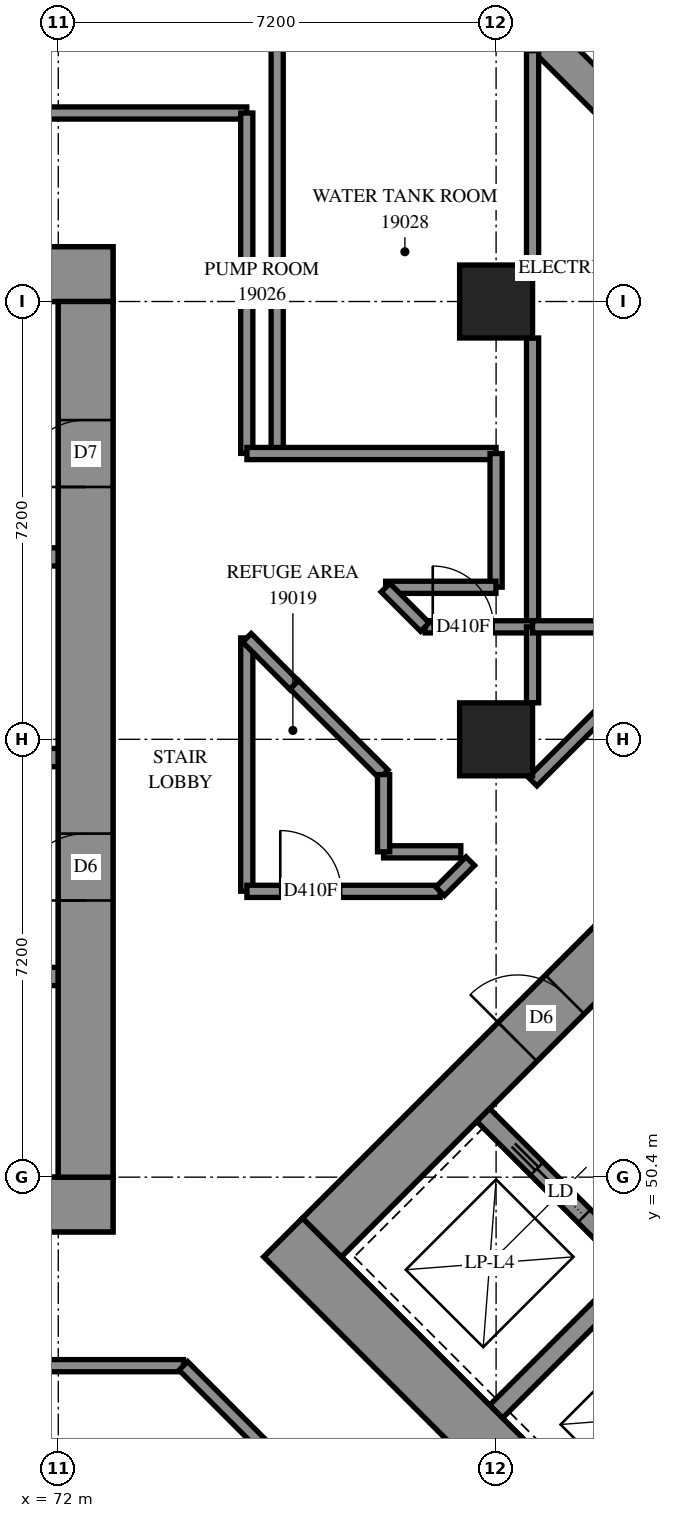
"""IFC4 building model, lengths in metres.
Left out: names, types, materials, properties, quantities, classifications, styles, units other than length and angle.
Written with IfcOpenShell. Run it as: python <this file> out.ifc"""

import sys

from ifc_helpers import new_model, si_unit, direction, frame, frame_2d, origin, origin_2d, place, context, subcontext, project, spatial, polyline, rectangle, outline, extrude, element, fill, save


model = new_model("IFC4")
c1 = context("Model", 3, precision=1e-05, world=origin(), true_north=direction((0.0, 1.0)))
c2 = subcontext(c1, "Body", "Model", "MODEL_VIEW")
j1 = project(units=[si_unit("LENGTHUNIT", "METRE"), si_unit("PLANEANGLEUNIT", "RADIAN")], contexts=[c1])
p1 = place(None, origin())
s1 = spatial("IfcSite", under=j1, at=p1, CompositionType="ELEMENT")
p2 = place(p1, origin())
s2 = spatial("IfcBuilding", under=s1, at=p2, CompositionType="ELEMENT")
p3 = place(p2, frame((0.0, 0.0, 72.0)))
s3 = spatial("IfcBuildingStorey", under=s2, at=p3, CompositionType="ELEMENT", Elevation=72.0)
for number, where, z_axis, x_axis in (
    (1, (79.2, 57.6, 0.0), (0.0, 0.0, 1.0), (1.0, 0.0, 0.0)),
    (2, (79.2, 64.8, 0.0), (0.0, 0.0, 1.0), (1.0, 0.0, 0.0)),
):
    element("IfcColumn", number, at=place(p3, frame(where, z_axis=z_axis, x_axis=x_axis)), inside=s3, PredefinedType="COLUMN", context=c2, shape_type="SweptSolid", body=[
        extrude(rectangle(XDim=1.2, YDim=1.2, at=origin_2d()), origin(), (0.0, 0.0, 1.0), 4.7),
    ])
p4 = place(p3, frame((56.7, 49.95, -0.3), z_axis=(0.0, 0.0, 1.0), x_axis=(1.0, 0.0, 0.0)))
e3 = element("IfcWall", 3, at=p4, inside=s3, PredefinedType="SHEAR", context=c2, shape_type="SweptSolid", body=[
    extrude(rectangle(XDim=16.2, YDim=0.9, at=frame_2d((8.1, 0.0))), origin(), (0.0, 0.0, 1.0), 4.3),
])
p5 = place(p3, frame((56.7, 65.25, -0.3), z_axis=(0.0, 0.0, 1.0), x_axis=(1.0, 0.0, 0.0)))
e4 = element("IfcWall", 4, at=p5, inside=s3, PredefinedType="SHEAR", context=c2, shape_type="SweptSolid", body=[
    extrude(rectangle(XDim=16.2, YDim=0.9, at=frame_2d((8.1, 0.0))), origin(), (0.0, 0.0, 1.0), 4.3),
])
p6 = place(p5, frame((10.9, 0.0, 0.3)))
e5 = element("IfcOpeningElement", 5, at=p6, cuts=e4, PredefinedType="OPENING", context=c2, shape_type="SweptSolid", body=[
    extrude(rectangle(XDim=0.8, YDim=2.1, at=frame_2d((0.4, 1.05))), frame((0.0, 0.46, 0.0), z_axis=(0.0, -1.0, 0.0), x_axis=(1.0, 0.0, 0.0)), (0.0, 0.0, 1.0), 0.92),
])
p7 = place(p3, frame((72.45, 50.4, -0.3), z_axis=(0.0, 0.0, 1.0), x_axis=(0.0, 1.0, 0.0)))
e6 = element("IfcWall", 6, at=p7, inside=s3, PredefinedType="SHEAR", context=c2, shape_type="SweptSolid", body=[
    extrude(rectangle(XDim=14.4, YDim=0.9, at=frame_2d((7.2, 0.0))), origin(), (0.0, 0.0, 1.0), 4.3),
])
p8 = place(p7, frame((4.55, 0.0, 0.3)))
e7 = element("IfcOpeningElement", 7, at=p8, cuts=e6, PredefinedType="OPENING", context=c2, shape_type="SweptSolid", body=[
    extrude(rectangle(XDim=1.1, YDim=2.1, at=frame_2d((0.55, 1.05))), frame((0.0, 0.46, 0.0), z_axis=(0.0, -1.0, 0.0), x_axis=(1.0, 0.0, 0.0)), (0.0, 0.0, 1.0), 0.92),
])
p9 = place(p7, frame((11.35, 0.0, 0.3)))
e8 = element("IfcOpeningElement", 8, at=p9, cuts=e6, PredefinedType="OPENING", context=c2, shape_type="SweptSolid", body=[
    extrude(rectangle(XDim=1.1, YDim=2.1, at=frame_2d((0.55, 1.05))), frame((0.0, 0.46, 0.0), z_axis=(0.0, -1.0, 0.0), x_axis=(1.0, 0.0, 0.0)), (0.0, 0.0, 1.0), 0.92),
])
p10 = place(p3, frame((57.6, 53.7, 0.0), z_axis=(0.0, 0.0, 1.0), x_axis=(1.0, 0.0, 0.0)))
e9 = element("IfcWall", 9, at=p10, inside=s3, PredefinedType="SOLIDWALL", context=c2, shape_type="SweptSolid", body=[
    extrude(rectangle(XDim=14.4, YDim=0.3, at=frame_2d((7.2, 0.0))), origin(), (0.0, 0.0, 1.0), 4.7),
])
p11 = place(p10, frame((1.25, 0.0, 0.0)))
e10 = element("IfcOpeningElement", 10, at=p11, cuts=e9, PredefinedType="OPENING", context=c2, shape_type="SweptSolid", body=[
    extrude(rectangle(XDim=1.1, YDim=2.1, at=frame_2d((0.55, 1.05))), frame((0.0, 0.16, 0.0), z_axis=(0.0, -1.0, 0.0), x_axis=(1.0, 0.0, 0.0)), (0.0, 0.0, 1.0), 0.32),
])
p12 = place(p10, frame((4.85, 0.0, 0.0)))
e11 = element("IfcOpeningElement", 11, at=p12, cuts=e9, PredefinedType="OPENING", context=c2, shape_type="SweptSolid", body=[
    extrude(rectangle(XDim=1.1, YDim=2.1, at=frame_2d((0.55, 1.05))), frame((0.0, 0.16, 0.0), z_axis=(0.0, -1.0, 0.0), x_axis=(1.0, 0.0, 0.0)), (0.0, 0.0, 1.0), 0.32),
])
p13 = place(p10, frame((8.45, 0.0, 0.0)))
e12 = element("IfcOpeningElement", 12, at=p13, cuts=e9, PredefinedType="OPENING", context=c2, shape_type="SweptSolid", body=[
    extrude(rectangle(XDim=1.1, YDim=2.1, at=frame_2d((0.55, 1.05))), frame((0.0, 0.16, 0.0), z_axis=(0.0, -1.0, 0.0), x_axis=(1.0, 0.0, 0.0)), (0.0, 0.0, 1.0), 0.32),
])
p14 = place(p10, frame((12.05, 0.0, 0.0)))
e13 = element("IfcOpeningElement", 13, at=p14, cuts=e9, PredefinedType="OPENING", context=c2, shape_type="SweptSolid", body=[
    extrude(rectangle(XDim=1.1, YDim=2.1, at=frame_2d((0.55, 1.05))), frame((0.0, 0.16, 0.0), z_axis=(0.0, -1.0, 0.0), x_axis=(1.0, 0.0, 0.0)), (0.0, 0.0, 1.0), 0.32),
])
p15 = place(p3, frame((57.6, 57.3, 0.0), z_axis=(0.0, 0.0, 1.0), x_axis=(1.0, 0.0, 0.0)))
e14 = element("IfcWall", 14, at=p15, inside=s3, PredefinedType="SOLIDWALL", context=c2, shape_type="SweptSolid", body=[
    extrude(rectangle(XDim=14.4, YDim=0.3, at=frame_2d((7.2, 0.0))), origin(), (0.0, 0.0, 1.0), 4.7),
])
p16 = place(p15, frame((12.05, 0.0, 0.0)))
e15 = element("IfcOpeningElement", 15, at=p16, cuts=e14, PredefinedType="OPENING", context=c2, shape_type="SweptSolid", body=[
    extrude(rectangle(XDim=1.1, YDim=2.1, at=frame_2d((0.55, 1.05))), frame((0.0, 0.16, 0.0), z_axis=(0.0, -1.0, 0.0), x_axis=(1.0, 0.0, 0.0)), (0.0, 0.0, 1.0), 0.32),
])
p17 = place(p3, frame((64.8, 60.6, 0.0), z_axis=(0.0, 0.0, 1.0), x_axis=(1.0, 0.0, 0.0)))
e16 = element("IfcWall", 16, at=p17, inside=s3, PredefinedType="SOLIDWALL", context=c2, shape_type="SweptSolid", body=[
    extrude(rectangle(XDim=7.2, YDim=0.3, at=frame_2d((3.6, 0.0))), origin(), (0.0, 0.0, 1.0), 4.7),
])
p18 = place(p3, frame((75.7, 49.408, -0.3), z_axis=(0.0, 0.0, 1.0), x_axis=(0.7071098676, -0.7071036948, 0.0)))
e17 = element("IfcWall", 17, at=p18, inside=s3, PredefinedType="SHEAR", context=c2, shape_type="SweptSolid", body=[
    extrude(rectangle(XDim=16.2, YDim=0.9, at=frame_2d((8.1, 0.0))), origin(), (0.0, 0.0, 1.0), 4.3),
])
p19 = place(p3, frame((76.336, 49.408, -0.3), z_axis=(0.0, 0.0, 1.0), x_axis=(0.7071067812, 0.7071067812, 0.0)))
e18 = element("IfcWall", 18, at=p19, inside=s3, PredefinedType="SHEAR", context=c2, shape_type="SweptSolid", body=[
    extrude(rectangle(XDim=14.4, YDim=0.9, at=frame_2d((7.2, 0.0))), origin(), (0.0, 0.0, 1.0), 4.3),
])
p20 = place(p19, frame((4.55, 0.0, 0.3)))
e19 = element("IfcOpeningElement", 19, at=p20, cuts=e18, PredefinedType="OPENING", context=c2, shape_type="SweptSolid", body=[
    extrude(rectangle(XDim=1.1, YDim=2.1, at=frame_2d((0.55, 1.05))), frame((0.0, 0.46, 0.0), z_axis=(0.0, -1.0, 0.0), x_axis=(1.0, 0.0, 0.0)), (0.0, 0.0, 1.0), 0.92),
])
p21 = place(p19, frame((11.35, 0.0, 0.3)))
e20 = element("IfcOpeningElement", 20, at=p21, cuts=e18, PredefinedType="OPENING", context=c2, shape_type="SweptSolid", body=[
    extrude(rectangle(XDim=1.1, YDim=2.1, at=frame_2d((0.55, 1.05))), frame((0.0, 0.46, 0.0), z_axis=(0.0, -1.0, 0.0), x_axis=(1.0, 0.0, 0.0)), (0.0, 0.0, 1.0), 0.92),
])
p22 = place(p3, frame((79.2, 46.544, 0.0), z_axis=(0.0, 0.0, 1.0), x_axis=(0.7071219326, 0.7070916295, 0.0)))
e21 = element("IfcWall", 21, at=p22, inside=s3, PredefinedType="SOLIDWALL", context=c2, shape_type="SweptSolid", body=[
    extrude(rectangle(XDim=3.3, YDim=0.3, at=frame_2d((1.65, 0.0))), origin(), (0.0, 0.0, 1.0), 4.7),
])
p23 = place(p3, frame((78.988, 51.423, 0.0), z_axis=(0.0, 0.0, 1.0), x_axis=(0.7071067812, -0.7071067812, 0.0)))
e22 = element("IfcWall", 22, at=p23, inside=s3, PredefinedType="SOLIDWALL", context=c2, shape_type="SweptSolid", body=[
    extrude(rectangle(XDim=14.4, YDim=0.3, at=frame_2d((7.2, 0.0))), origin(), (0.0, 0.0, 1.0), 4.7),
])
p24 = place(p23, frame((1.25, 0.0, 0.0)))
e23 = element("IfcOpeningElement", 23, at=p24, cuts=e22, PredefinedType="OPENING", context=c2, shape_type="SweptSolid", body=[
    extrude(rectangle(XDim=1.1, YDim=2.1, at=frame_2d((0.55, 1.05))), frame((0.0, 0.16, 0.0), z_axis=(0.0, -1.0, 0.0), x_axis=(1.0, 0.0, 0.0)), (0.0, 0.0, 1.0), 0.32),
])
p25 = place(p23, frame((4.85, 0.0, 0.0)))
e24 = element("IfcOpeningElement", 24, at=p25, cuts=e22, PredefinedType="OPENING", context=c2, shape_type="SweptSolid", body=[
    extrude(rectangle(XDim=1.1, YDim=2.1, at=frame_2d((0.55, 1.05))), frame((0.0, 0.16, 0.0), z_axis=(0.0, -1.0, 0.0), x_axis=(1.0, 0.0, 0.0)), (0.0, 0.0, 1.0), 0.32),
])
p26 = place(p23, frame((8.45, 0.0, 0.0)))
e25 = element("IfcOpeningElement", 25, at=p26, cuts=e22, PredefinedType="OPENING", context=c2, shape_type="SweptSolid", body=[
    extrude(rectangle(XDim=1.1, YDim=2.1, at=frame_2d((0.55, 1.05))), frame((0.0, 0.16, 0.0), z_axis=(0.0, -1.0, 0.0), x_axis=(1.0, 0.0, 0.0)), (0.0, 0.0, 1.0), 0.32),
])
p27 = place(p23, frame((12.05, 0.0, 0.0)))
e26 = element("IfcOpeningElement", 26, at=p27, cuts=e22, PredefinedType="OPENING", context=c2, shape_type="SweptSolid", body=[
    extrude(rectangle(XDim=1.1, YDim=2.1, at=frame_2d((0.55, 1.05))), frame((0.0, 0.16, 0.0), z_axis=(0.0, -1.0, 0.0), x_axis=(1.0, 0.0, 0.0)), (0.0, 0.0, 1.0), 0.32),
])
p28 = place(p3, frame((111.055, 38.059, 0.0), z_axis=(0.0, 0.0, 1.0), x_axis=(-0.7071078702, 0.7071056922, 0.0)))
e27 = element("IfcWall", 27, at=p28, inside=s3, PredefinedType="SOLIDWALL", context=c2, shape_type="SweptSolid", body=[
    extrude(outline(polyline([(-0.275, -0.275), (46.028, -0.275), (45.8, 0.275), (0.275, 0.275), (-0.275, -0.275)])), origin(), (0.0, 0.0, 1.0), 4.7),
])
p29 = place(p3, frame((112.929, 39.756, 0.0), z_axis=(0.0, 0.0, 1.0), x_axis=(-0.7071067812, 0.7071067812, 0.0)))
e28 = element("IfcWall", 28, at=p29, inside=s3, PredefinedType="SOLIDWALL", context=c2, shape_type="SweptSolid", body=[
    extrude(outline(polyline([(-0.1, -0.1), (47.126, -0.1), (47.044, 0.1), (0.1, 0.1), (-0.1, -0.1)])), origin(), (0.0, 0.0, 1.0), 4.7),
])
p30 = place(p3, frame((54.502, 67.9, 0.0), z_axis=(0.0, 0.0, 1.0), x_axis=(1.0, 0.0, 0.0)))
e29 = element("IfcWall", 29, at=p30, inside=s3, PredefinedType="PARTITIONING", context=c2, shape_type="SweptSolid", body=[
    extrude(rectangle(XDim=20.598, YDim=0.2, at=frame_2d((10.299, 0.0))), origin(), (0.0, 0.0, 1.0), 4.7),
])
p31 = place(p30, frame((1.871, 0.0, 0.0)))
e30 = element("IfcOpeningElement", 30, at=p31, cuts=e29, PredefinedType="OPENING", context=c2, shape_type="SweptSolid", body=[
    extrude(rectangle(XDim=1.0, YDim=2.1, at=frame_2d((0.5, 1.05))), frame((0.0, 0.11, 0.0), z_axis=(0.0, -1.0, 0.0), x_axis=(1.0, 0.0, 0.0)), (0.0, 0.0, 1.0), 0.22),
])
p32 = place(p30, frame((16.273, 0.0, 0.0)))
e31 = element("IfcOpeningElement", 31, at=p32, cuts=e29, PredefinedType="OPENING", context=c2, shape_type="SweptSolid", body=[
    extrude(rectangle(XDim=1.0, YDim=2.1, at=frame_2d((0.5, 1.05))), frame((0.0, 0.11, 0.0), z_axis=(0.0, -1.0, 0.0), x_axis=(1.0, 0.0, 0.0)), (0.0, 0.0, 1.0), 0.22),
])
p33 = place(p30, frame((9.036, 0.0, 0.0)))
e32 = element("IfcOpeningElement", 32, at=p33, cuts=e29, PredefinedType="OPENING", context=c2, shape_type="SweptSolid", body=[
    extrude(rectangle(XDim=1.0, YDim=2.1, at=frame_2d((0.5, 1.05))), frame((0.0, 0.11, 0.0), z_axis=(0.0, -1.0, 0.0), x_axis=(1.0, 0.0, 0.0)), (0.0, 0.0, 1.0), 0.22),
])
p34 = place(p3, frame((54.5, 47.3, 0.0), z_axis=(0.0, 0.0, 1.0), x_axis=(1.0, 0.0, 0.0)))
e33 = element("IfcWall", 33, at=p34, inside=s3, PredefinedType="PARTITIONING", context=c2, shape_type="SweptSolid", body=[
    extrude(rectangle(XDim=19.56, YDim=0.2, at=frame_2d((9.78, 0.0))), origin(), (0.0, 0.0, 1.0), 4.7),
])
p35 = place(p34, frame((0.243, 0.0, 0.0)))
e34 = element("IfcOpeningElement", 34, at=p35, cuts=e33, PredefinedType="OPENING", context=c2, shape_type="SweptSolid", body=[
    extrude(rectangle(XDim=1.0, YDim=2.1, at=frame_2d((0.5, 1.05))), frame((0.0, 0.11, 0.0), z_axis=(0.0, -1.0, 0.0), x_axis=(1.0, 0.0, 0.0)), (0.0, 0.0, 1.0), 0.22),
])
p36 = place(p34, frame((12.457, 0.0, 0.0)))
e35 = element("IfcOpeningElement", 35, at=p36, cuts=e33, PredefinedType="OPENING", context=c2, shape_type="SweptSolid", body=[
    extrude(rectangle(XDim=1.0, YDim=2.1, at=frame_2d((0.5, 1.05))), frame((0.0, 0.11, 0.0), z_axis=(0.0, -1.0, 0.0), x_axis=(1.0, 0.0, 0.0)), (0.0, 0.0, 1.0), 0.22),
])
p37 = place(p3, frame((75.6, 62.3, 0.0), z_axis=(0.0, 0.0, 1.0), x_axis=(0.0, 1.0, 0.0)))
e36 = element("IfcWall", 36, at=p37, inside=s3, PredefinedType="PARTITIONING", context=c2, shape_type="SweptSolid", body=[
    extrude(rectangle(XDim=7.95, YDim=0.2, at=frame_2d((3.975, 0.0))), origin(), (0.0, 0.0, 1.0), 4.7),
])
p38 = place(p3, frame((75.1, 62.302, 0.0), z_axis=(0.0, 0.0, 1.0), x_axis=(0.0, 1.0, 0.0)))
e37 = element("IfcWall", 37, at=p38, inside=s3, PredefinedType="PARTITIONING", context=c2, shape_type="SweptSolid", body=[
    extrude(rectangle(XDim=5.598, YDim=0.2, at=frame_2d((2.799, 0.0))), origin(), (0.0, 0.0, 1.0), 4.7),
])
p39 = place(p3, frame((79.8, 59.45, 0.0), z_axis=(0.0, 0.0, 1.0), x_axis=(0.0, 1.0, 0.0)))
e38 = element("IfcWall", 38, at=p39, inside=s3, PredefinedType="PARTITIONING", context=c2, shape_type="SweptSolid", body=[
    extrude(rectangle(XDim=4.75, YDim=0.2, at=frame_2d((2.375, 0.0))), origin(), (0.0, 0.0, 1.0), 4.7),
])
p40 = place(p3, frame((75.1, 55.102, 0.0), z_axis=(0.0, 0.0, 1.0), x_axis=(0.0, 1.0, 0.0)))
e39 = element("IfcWall", 39, at=p40, inside=s3, PredefinedType="PARTITIONING", context=c2, shape_type="SweptSolid", body=[
    extrude(rectangle(XDim=4.166, YDim=0.2, at=frame_2d((2.083, 0.0))), origin(), (0.0, 0.0, 1.0), 4.7),
])
p41 = place(p3, frame((75.102, 62.3, 0.0), z_axis=(0.0, 0.0, 1.0), x_axis=(1.0, 0.0, 0.0)))
e40 = element("IfcWall", 40, at=p41, inside=s3, PredefinedType="PARTITIONING", context=c2, shape_type="SweptSolid", body=[
    extrude(rectangle(XDim=4.098, YDim=0.2, at=frame_2d((2.049, 0.0))), origin(), (0.0, 0.0, 1.0), 4.7),
])
p42 = place(p3, frame((79.8, 65.4, 0.0), z_axis=(0.0, 0.0, 1.0), x_axis=(0.0, 1.0, 0.0)))
e41 = element("IfcWall", 41, at=p42, inside=s3, PredefinedType="PARTITIONING", context=c2, shape_type="SweptSolid", body=[
    extrude(rectangle(XDim=3.525, YDim=0.2, at=frame_2d((1.763, 0.0))), origin(), (0.0, 0.0, 1.0), 4.7),
])
p43 = place(p3, frame((74.057, 47.297, 0.0), z_axis=(0.0, 0.0, 1.0), x_axis=(0.707121846, -0.707091716, 0.0)))
e42 = element("IfcWall", 42, at=p43, inside=s3, PredefinedType="PARTITIONING", context=c2, shape_type="SweptSolid", body=[
    extrude(rectangle(XDim=3.319, YDim=0.2, at=frame_2d((1.659, 0.0))), origin(), (0.0, 0.0, 1.0), 4.7),
])
p44 = place(p3, frame((75.102, 55.1, 0.0), z_axis=(0.0, 0.0, 1.0), x_axis=(1.0, 0.0, 0.0)))
e43 = element("IfcWall", 43, at=p44, inside=s3, PredefinedType="PARTITIONING", context=c2, shape_type="SweptSolid", body=[
    extrude(rectangle(XDim=3.178, YDim=0.2, at=frame_2d((1.589, 0.0))), origin(), (0.0, 0.0, 1.0), 4.7),
])
p45 = place(p44, frame((0.549, 0.0, 0.0)))
e44 = element("IfcOpeningElement", 44, at=p45, cuts=e43, PredefinedType="OPENING", context=c2, shape_type="SweptSolid", body=[
    extrude(rectangle(XDim=1.0, YDim=2.1, at=frame_2d((0.5, 1.05))), frame((0.0, 0.11, 0.0), z_axis=(0.0, -1.0, 0.0), x_axis=(1.0, 0.0, 0.0)), (0.0, 0.0, 1.0), 0.22),
])
p46 = place(p3, frame((79.2, 60.102, 0.0), z_axis=(0.0, 0.0, 1.0), x_axis=(0.0, 1.0, 0.0)))
e45 = element("IfcWall", 45, at=p46, inside=s3, PredefinedType="PARTITIONING", context=c2, shape_type="SweptSolid", body=[
    extrude(rectangle(XDim=2.198, YDim=0.2, at=frame_2d((1.099, 0.0))), origin(), (0.0, 0.0, 1.0), 4.7),
])
p47 = place(p3, frame((75.879, 58.497, 0.0), z_axis=(0.0, 0.0, 1.0), x_axis=(0.7075866635, -0.706626573, 0.0)))
e46 = element("IfcWall", 46, at=p47, inside=s3, PredefinedType="PARTITIONING", context=c2, shape_type="SweptSolid", body=[
    extrude(rectangle(XDim=2.083, YDim=0.2, at=frame_2d((1.042, 0.0))), origin(), (0.0, 0.0, 1.0), 4.7),
])
p48 = place(p3, frame((77.384, 60.1, 0.0), z_axis=(0.0, 0.0, 1.0), x_axis=(1.0, 0.0, 0.0)))
e47 = element("IfcWall", 47, at=p48, inside=s3, PredefinedType="PARTITIONING", context=c2, shape_type="SweptSolid", body=[
    extrude(rectangle(XDim=1.814, YDim=0.2, at=frame_2d((0.907, 0.0))), origin(), (0.0, 0.0, 1.0), 4.7),
])
p49 = place(p3, frame((78.032, 59.45, 0.0), z_axis=(0.0, 0.0, 1.0), x_axis=(1.0, 0.0, 0.0)))
e48 = element("IfcWall", 48, at=p49, inside=s3, PredefinedType="PARTITIONING", context=c2, shape_type="SweptSolid", body=[
    extrude(rectangle(XDim=1.768, YDim=0.2, at=frame_2d((0.884, 0.0))), origin(), (0.0, 0.0, 1.0), 4.7),
])
p50 = place(p49, frame((0.126, 0.0, 0.0)))
e49 = element("IfcOpeningElement", 49, at=p50, cuts=e48, PredefinedType="OPENING", context=c2, shape_type="SweptSolid", body=[
    extrude(rectangle(XDim=1.0, YDim=2.1, at=frame_2d((0.5, 1.05))), frame((0.0, 0.11, 0.0), z_axis=(0.0, -1.0, 0.0), x_axis=(1.0, 0.0, 0.0)), (0.0, 0.0, 1.0), 0.22),
])
p51 = place(p3, frame((79.801, 56.905, 0.0), z_axis=(0.0, 0.0, 1.0), x_axis=(0.7071067812, 0.7071067812, 0.0)))
e50 = element("IfcWall", 50, at=p51, inside=s3, PredefinedType="PARTITIONING", context=c2, shape_type="SweptSolid", body=[
    extrude(rectangle(XDim=1.765, YDim=0.2, at=frame_2d((0.882, 0.0))), origin(), (0.0, 0.0, 1.0), 4.7),
])
for number, where, z_axis, x_axis in (
    (51, (77.35, 55.75, 0.0), (0.0, 0.0, 1.0), (1.0, 0.0, 0.0)),
    (52, (77.35, 55.75, 0.0), (0.0, 0.0, 1.0), (0.0, 1.0, 0.0)),
):
    element("IfcWall", number, at=place(p3, frame(where, z_axis=z_axis, x_axis=x_axis)), inside=s3, PredefinedType="PARTITIONING", context=c2, shape_type="SweptSolid", body=[
        extrude(rectangle(XDim=1.27, YDim=0.2, at=frame_2d((0.635, 0.0))), origin(), (0.0, 0.0, 1.0), 4.7),
    ])
p52 = place(p3, frame((79.8, 58.2, 0.0), z_axis=(0.0, 0.0, 1.0), x_axis=(0.0, 1.0, 0.0)))
e53 = element("IfcWall", 53, at=p52, inside=s3, PredefinedType="PARTITIONING", context=c2, shape_type="SweptSolid", body=[
    extrude(rectangle(XDim=1.25, YDim=0.2, at=frame_2d((0.625, 0.0))), origin(), (0.0, 0.0, 1.0), 4.7),
])
p53 = place(p3, frame((79.8, 59.45, 0.0), z_axis=(0.0, 0.0, 1.0), x_axis=(1.0, 0.0, 0.0)))
e54 = element("IfcWall", 54, at=p53, inside=s3, PredefinedType="PARTITIONING", context=c2, shape_type="SweptSolid", body=[
    extrude(rectangle(XDim=1.248, YDim=0.2, at=frame_2d((0.624, 0.0))), origin(), (0.0, 0.0, 1.0), 4.7),
])
p54 = place(p3, frame((75.102, 59.27, 0.0), z_axis=(0.0, 0.0, 1.0), x_axis=(0.7061937975, -0.7080185876, 0.0)))
e55 = element("IfcWall", 55, at=p54, inside=s3, PredefinedType="PARTITIONING", context=c2, shape_type="SweptSolid", body=[
    extrude(rectangle(XDim=1.096, YDim=0.2, at=frame_2d((0.548, 0.0))), origin(), (0.0, 0.0, 1.0), 4.7),
])
p55 = place(p3, frame((77.381, 60.095, 0.0), z_axis=(0.0, 0.0, 1.0), x_axis=(0.7071067812, -0.7071067812, 0.0)))
e56 = element("IfcWall", 56, at=p55, inside=s3, PredefinedType="PARTITIONING", context=c2, shape_type="SweptSolid", body=[
    extrude(rectangle(XDim=0.916, YDim=0.2, at=frame_2d((0.458, 0.0))), origin(), (0.0, 0.0, 1.0), 4.7),
])
p56 = place(p3, frame((78.279, 55.1, 0.0), z_axis=(0.0, 0.0, 1.0), x_axis=(0.7071067812, 0.7071067812, 0.0)))
e57 = element("IfcWall", 57, at=p56, inside=s3, PredefinedType="PARTITIONING", context=c2, shape_type="SweptSolid", body=[
    extrude(rectangle(XDim=0.701, YDim=0.2, at=frame_2d((0.351, 0.0))), origin(), (0.0, 0.0, 1.0), 4.7),
])
p57 = place(p8, origin())
e58 = element("IfcDoor", 58, at=p57, inside=s3, OperationType="DOUBLE_DOOR_SINGLE_SWING", PredefinedType="DOOR", context=c2, shape_type="SweptSolid", body=[
    extrude(rectangle(XDim=1.1, YDim=2.1, at=frame_2d((0.55, 1.05))), frame((0.0, 0.025, 0.0), z_axis=(0.0, -1.0, 0.0), x_axis=(1.0, 0.0, 0.0)), (0.0, 0.0, 1.0), 0.05),
])
fill(e7, e58)
p58 = place(p9, origin())
e59 = element("IfcDoor", 59, at=p58, inside=s3, OperationType="SINGLE_SWING_RIGHT", PredefinedType="DOOR", context=c2, shape_type="SweptSolid", body=[
    extrude(rectangle(XDim=1.1, YDim=2.1, at=frame_2d((0.55, 1.05))), frame((0.0, 0.025, 0.0), z_axis=(0.0, -1.0, 0.0), x_axis=(1.0, 0.0, 0.0)), (0.0, 0.0, 1.0), 0.05),
])
fill(e8, e59)
p59 = place(p20, origin())
e60 = element("IfcDoor", 60, at=p59, inside=s3, OperationType="DOUBLE_DOOR_SINGLE_SWING", PredefinedType="DOOR", context=c2, shape_type="SweptSolid", body=[
    extrude(rectangle(XDim=1.1, YDim=2.1, at=frame_2d((0.55, 1.05))), frame((0.0, 0.025, 0.0), z_axis=(0.0, -1.0, 0.0), x_axis=(1.0, 0.0, 0.0)), (0.0, 0.0, 1.0), 0.05),
])
fill(e19, e60)
p60 = place(p24, origin())
e61 = element("IfcDoor", 61, at=p60, inside=s3, OperationType="SLIDING_TO_LEFT", PredefinedType="DOOR", context=c2, shape_type="SweptSolid", body=[
    extrude(rectangle(XDim=1.1, YDim=2.1, at=frame_2d((0.55, 1.05))), frame((0.0, 0.025, 0.0), z_axis=(0.0, -1.0, 0.0), x_axis=(1.0, 0.0, 0.0)), (0.0, 0.0, 1.0), 0.05),
])
fill(e23, e61)
p61 = place(p45, origin())
e62 = element("IfcDoor", 62, at=p61, inside=s3, OperationType="SINGLE_SWING_LEFT", PredefinedType="DOOR", context=c2, shape_type="SweptSolid", body=[
    extrude(rectangle(XDim=1.0, YDim=2.1, at=frame_2d((0.5, 1.05))), frame((0.0, 0.025, 0.0), z_axis=(0.0, -1.0, 0.0), x_axis=(1.0, 0.0, 0.0)), (0.0, 0.0, 1.0), 0.05),
])
fill(e44, e62)
p62 = place(p50, origin())
e63 = element("IfcDoor", 63, at=p62, inside=s3, OperationType="SINGLE_SWING_LEFT", PredefinedType="DOOR", context=c2, shape_type="SweptSolid", body=[
    extrude(rectangle(XDim=1.0, YDim=2.1, at=frame_2d((0.5, 1.05))), frame((0.0, 0.025, 0.0), z_axis=(0.0, -1.0, 0.0), x_axis=(1.0, 0.0, 0.0)), (0.0, 0.0, 1.0), 0.05),
])
fill(e49, e63)
save(model, sys.argv[1])
